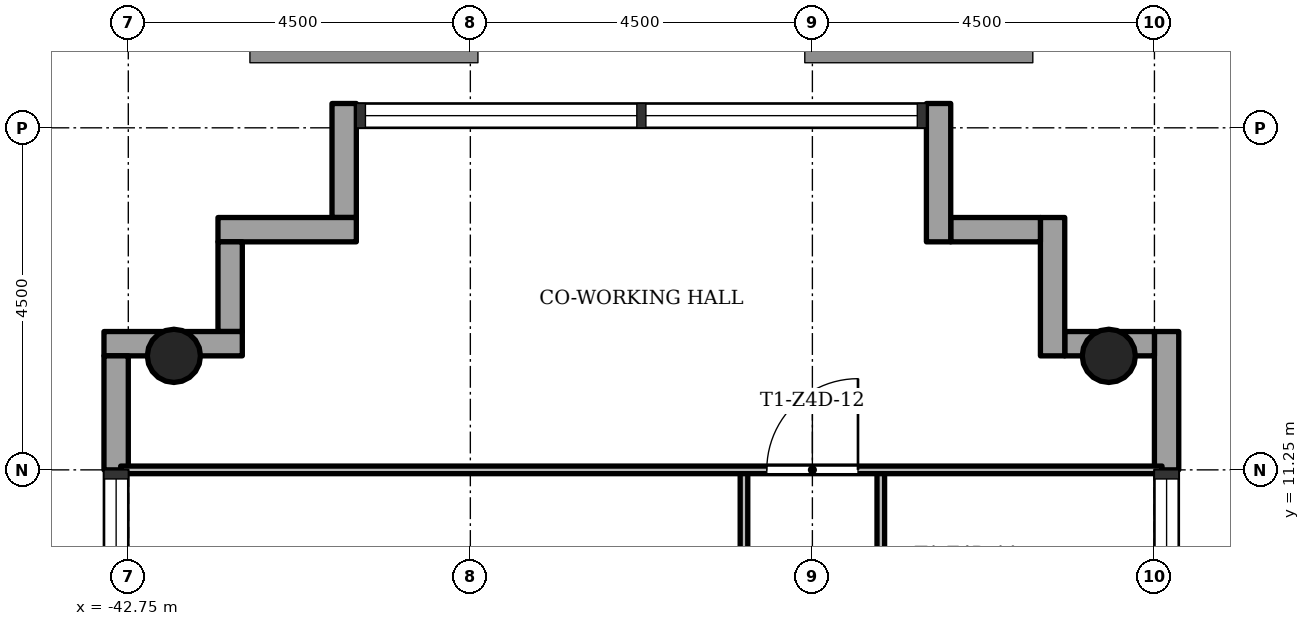
"""IFC4 building model, lengths in metres.
Left out: names, types, materials, properties, quantities, classifications, styles, units other than length and angle.
Written with IfcOpenShell. Run it as: python <this file> out.ifc"""

import sys

from ifc_helpers import new_model, si_unit, direction, frame, frame_2d, origin, origin_2d, place, context, subcontext, project, spatial, rectangle, hollow_circle, extrude, element, fill, save


model = new_model("IFC4")
c1 = context("Model", 3, precision=1e-05, world=origin(), true_north=direction((0.0, 1.0)))
c2 = subcontext(c1, "Body", "Model", "MODEL_VIEW")
j1 = project(units=[si_unit("LENGTHUNIT", "METRE"), si_unit("PLANEANGLEUNIT", "RADIAN")], contexts=[c1])
p1 = place(None, origin())
s1 = spatial("IfcSite", under=j1, at=p1, CompositionType="ELEMENT")
p2 = place(p1, origin())
s2 = spatial("IfcBuilding", under=s1, at=p2, CompositionType="ELEMENT")
p3 = place(p2, frame((0.0, 0.0, 196.0)))
s3 = spatial("IfcBuildingStorey", under=s2, at=p3, CompositionType="ELEMENT", Elevation=196.0)
for number, where, z_axis, x_axis in (
    (1, (-29.85, 12.75, 0.0), (0.0, 0.0, 1.0), (1.0, 0.0, 0.0)),
    (2, (-42.15, 12.75, 0.0), (0.0, 0.0, 1.0), (1.0, 0.0, 0.0)),
):
    element("IfcColumn", number, at=place(p3, frame(where, z_axis=z_axis, x_axis=x_axis)), inside=s3, PredefinedType="COLUMN", context=c2, shape_type="SweptSolid", body=[
        extrude(hollow_circle(Radius=0.35, WallThickness=0.025, at=origin_2d()), origin(), (0.0, 0.0, 1.0), 3.4),
    ])
p4 = place(p3, frame((-29.09, 11.25, -0.3), z_axis=(0.0, 0.0, 1.0), x_axis=(0.0, 1.0, 0.0)))
e3 = element("IfcWall", 3, at=p4, inside=s3, PredefinedType="STANDARD", context=c2, shape_type="SweptSolid", body=[
    extrude(rectangle(XDim=1.82, YDim=0.32, at=frame_2d((0.91, 0.0))), origin(), (0.0, 0.0, 1.0), 3.4),
])
p5 = place(p3, frame((-29.25, 12.91, -0.3), z_axis=(0.0, 0.0, 1.0), x_axis=(-1.0, 0.0, 0.0)))
e4 = element("IfcWall", 4, at=p5, inside=s3, PredefinedType="STANDARD", context=c2, shape_type="SweptSolid", body=[
    extrude(rectangle(XDim=1.18, YDim=0.32, at=frame_2d((0.59, 0.0))), origin(), (0.0, 0.0, 1.0), 3.4),
])
p6 = place(p3, frame((-30.59, 12.75, -0.3), z_axis=(0.0, 0.0, 1.0), x_axis=(0.0, 1.0, 0.0)))
e5 = element("IfcWall", 5, at=p6, inside=s3, PredefinedType="STANDARD", context=c2, shape_type="SweptSolid", body=[
    extrude(rectangle(XDim=1.82, YDim=0.32, at=frame_2d((0.91, 0.0))), origin(), (0.0, 0.0, 1.0), 3.4),
])
p7 = place(p3, frame((-30.75, 14.41, -0.3), z_axis=(0.0, 0.0, 1.0), x_axis=(-1.0, 0.0, 0.0)))
e6 = element("IfcWall", 6, at=p7, inside=s3, PredefinedType="STANDARD", context=c2, shape_type="SweptSolid", body=[
    extrude(rectangle(XDim=1.18, YDim=0.32, at=frame_2d((0.59, 0.0))), origin(), (0.0, 0.0, 1.0), 3.4),
])
p8 = place(p3, frame((-32.09, 14.25, -0.3), z_axis=(0.0, 0.0, 1.0), x_axis=(0.0, 1.0, 0.0)))
e7 = element("IfcWall", 7, at=p8, inside=s3, PredefinedType="STANDARD", context=c2, shape_type="SweptSolid", body=[
    extrude(rectangle(XDim=1.82, YDim=0.32, at=frame_2d((0.91, 0.0))), origin(), (0.0, 0.0, 1.0), 3.4),
])
p9 = place(p3, frame((-39.91, 16.07, -0.3), z_axis=(0.0, 0.0, 1.0), x_axis=(0.0, -1.0, 0.0)))
e8 = element("IfcWall", 8, at=p9, inside=s3, PredefinedType="STANDARD", context=c2, shape_type="SweptSolid", body=[
    extrude(rectangle(XDim=1.5, YDim=0.32, at=frame_2d((0.75, 0.0))), origin(), (0.0, 0.0, 1.0), 3.4),
])
p10 = place(p3, frame((-39.75, 14.41, -0.3), z_axis=(0.0, 0.0, 1.0), x_axis=(-1.0, 0.0, 0.0)))
e9 = element("IfcWall", 9, at=p10, inside=s3, PredefinedType="STANDARD", context=c2, shape_type="SweptSolid", body=[
    extrude(rectangle(XDim=1.82, YDim=0.32, at=frame_2d((0.91, 0.0))), origin(), (0.0, 0.0, 1.0), 3.4),
])
p11 = place(p3, frame((-41.41, 14.25, -0.3), z_axis=(0.0, 0.0, 1.0), x_axis=(0.0, -1.0, 0.0)))
e10 = element("IfcWall", 10, at=p11, inside=s3, PredefinedType="STANDARD", context=c2, shape_type="SweptSolid", body=[
    extrude(rectangle(XDim=1.18, YDim=0.32, at=frame_2d((0.59, 0.0))), origin(), (0.0, 0.0, 1.0), 3.4),
])
p12 = place(p3, frame((-41.25, 12.91, -0.3), z_axis=(0.0, 0.0, 1.0), x_axis=(-1.0, 0.0, 0.0)))
e11 = element("IfcWall", 11, at=p12, inside=s3, PredefinedType="STANDARD", context=c2, shape_type="SweptSolid", body=[
    extrude(rectangle(XDim=1.82, YDim=0.32, at=frame_2d((0.91, 0.0))), origin(), (0.0, 0.0, 1.0), 3.4),
])
p13 = place(p3, frame((-42.91, 12.75, -0.3), z_axis=(0.0, 0.0, 1.0), x_axis=(0.0, -1.0, 0.0)))
e12 = element("IfcWall", 12, at=p13, inside=s3, PredefinedType="STANDARD", context=c2, shape_type="SweptSolid", body=[
    extrude(rectangle(XDim=1.5, YDim=0.32, at=frame_2d((0.75, 0.0))), origin(), (0.0, 0.0, 1.0), 3.4),
])
p14 = place(p3, frame((-34.65, 8.55, 0.0), z_axis=(0.0, 0.0, 1.0), x_axis=(0.0, 1.0, 0.0)))
e13 = element("IfcWall", 13, at=p14, inside=s3, PredefinedType="PARTITIONING", context=c2, shape_type="SweptSolid", body=[
    extrude(rectangle(XDim=2.7, YDim=0.1, at=frame_2d((1.35, 0.0))), origin(), (0.0, 0.0, 1.0), 3.0),
])
p15 = place(p14, frame((0.07, 0.0, 0.0)))
e14 = element("IfcOpeningElement", 14, at=p15, cuts=e13, PredefinedType="OPENING", context=c2, shape_type="SweptSolid", body=[
    extrude(rectangle(XDim=0.9, YDim=2.1, at=frame_2d((0.45, 1.05))), frame((0.0, 0.06, 0.0), z_axis=(0.0, -1.0, 0.0), x_axis=(1.0, 0.0, 0.0)), (0.0, 0.0, 1.0), 0.12),
])
p16 = place(p3, frame((-32.85, 6.75, 0.0), z_axis=(0.0, 0.0, 1.0), x_axis=(0.0, 1.0, 0.0)))
e15 = element("IfcWall", 15, at=p16, inside=s3, PredefinedType="PARTITIONING", context=c2, shape_type="SweptSolid", body=[
    extrude(rectangle(XDim=4.5, YDim=0.1, at=frame_2d((2.25, 0.0))), origin(), (0.0, 0.0, 1.0), 3.0),
])
p17 = place(p16, frame((1.8, 0.0, 0.0)))
e16 = element("IfcOpeningElement", 16, at=p17, cuts=e15, PredefinedType="OPENING", context=c2, shape_type="SweptSolid", body=[
    extrude(rectangle(XDim=0.9, YDim=2.1, at=frame_2d((0.45, 1.05))), frame((0.0, 0.06, 0.0), z_axis=(0.0, -1.0, 0.0), x_axis=(1.0, 0.0, 0.0)), (0.0, 0.0, 1.0), 0.12),
])
p18 = place(p3, frame((-42.85, 11.25, 0.0), z_axis=(0.0, 0.0, 1.0), x_axis=(1.0, 0.0, 0.0)))
e17 = element("IfcWall", 17, at=p18, inside=s3, PredefinedType="PARTITIONING", context=c2, shape_type="SweptSolid", body=[
    extrude(rectangle(XDim=13.7, YDim=0.1, at=frame_2d((6.85, 0.0))), origin(), (0.0, 0.0, 1.0), 3.0),
])
p19 = place(p18, frame((8.5, 0.0, 0.0)))
e18 = element("IfcOpeningElement", 18, at=p19, cuts=e17, PredefinedType="OPENING", context=c2, shape_type="SweptSolid", body=[
    extrude(rectangle(XDim=1.2, YDim=2.1, at=frame_2d((0.6, 1.05))), frame((0.0, 0.06, 0.0), z_axis=(0.0, -1.0, 0.0), x_axis=(1.0, 0.0, 0.0)), (0.0, 0.0, 1.0), 0.12),
])
p20 = place(p19, origin())
e19 = element("IfcDoor", 19, at=p20, inside=s3, OperationType="SINGLE_SWING_LEFT", PredefinedType="DOOR", context=c2, shape_type="SweptSolid", body=[
    extrude(rectangle(XDim=1.2, YDim=2.1, at=frame_2d((0.6, 1.05))), frame((0.0, 0.025, 0.0), z_axis=(0.0, -1.0, 0.0), x_axis=(1.0, 0.0, 0.0)), (0.0, 0.0, 1.0), 0.05),
])
fill(e18, e19)
save(model, sys.argv[1])
